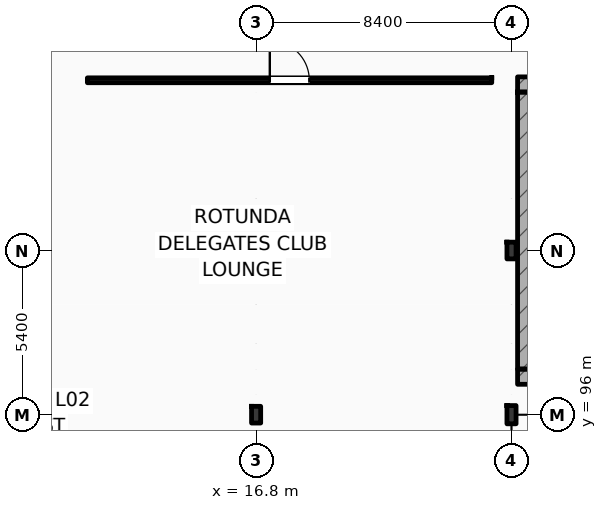
"""IFC4 building model, lengths in metres.
Left out: names, types, materials, properties, quantities, classifications, styles, units other than length and angle.
Written with IfcOpenShell. Run it as: python <this file> out.ifc"""

import sys

from ifc_helpers import new_model, si_unit, direction, frame, frame_2d, origin, origin_2d, place, context, subcontext, project, spatial, rectangle, i_section, extrude, element, fill, save


model = new_model("IFC4")
c1 = context("Model", 3, precision=1e-05, world=origin(), true_north=direction((0.0, 1.0)))
c2 = subcontext(c1, "Body", "Model", "MODEL_VIEW")
j1 = project(units=[si_unit("LENGTHUNIT", "METRE"), si_unit("PLANEANGLEUNIT", "RADIAN")], contexts=[c1])
p1 = place(None, origin())
s1 = spatial("IfcSite", under=j1, at=p1, CompositionType="ELEMENT")
p2 = place(p1, origin())
s2 = spatial("IfcBuilding", under=s1, at=p2, CompositionType="ELEMENT")
p3 = place(p2, frame((0.0, 0.0, 11.4)))
s3 = spatial("IfcBuildingStorey", under=s2, at=p3, CompositionType="ELEMENT", Elevation=11.4)
p4 = place(p3, frame((16.8, 96.0, 0.0), z_axis=(0.0, 0.0, 1.0), x_axis=(1.0, 0.0, 0.0)))
e1 = element("IfcColumn", 1, at=p4, inside=s3, PredefinedType="COLUMN", context=c2, shape_type="SweptSolid", body=[
    extrude(i_section(OverallWidth=0.3, OverallDepth=0.55, WebThickness=0.015, FlangeThickness=0.029, FilletRadius=0.027, at=origin_2d()), origin(), (0.0, 0.0, 1.0), 4.8),
])
p5 = place(p3, frame((25.2, 96.0, 0.0), z_axis=(0.0, 0.0, 1.0), x_axis=(1.0, 0.0, 0.0)))
e2 = element("IfcColumn", 2, at=p5, inside=s3, PredefinedType="COLUMN", context=c2, shape_type="SweptSolid", body=[
    extrude(i_section(OverallWidth=0.3, OverallDepth=0.6, WebThickness=0.015, FlangeThickness=0.03, FilletRadius=0.027, at=origin_2d()), origin(), (0.0, 0.0, 1.0), 4.8),
])
for number, where, z_axis, x_axis in (
    (3, (16.8, 101.4, 0.0), (0.0, 0.0, 1.0), (1.0, 0.0, 0.0)),
    (4, (25.2, 101.4, 0.0), (0.0, 0.0, 1.0), (1.0, 0.0, 0.0)),
):
    element("IfcColumn", number, at=place(p3, frame(where, z_axis=z_axis, x_axis=x_axis)), inside=s3, PredefinedType="COLUMN", context=c2, shape_type="SweptSolid", body=[
        extrude(i_section(OverallWidth=0.3, OverallDepth=0.55, WebThickness=0.015, FlangeThickness=0.029, FilletRadius=0.027, at=origin_2d()), origin(), (0.0, 0.0, 1.0), 4.8),
    ])
for number, where, z_axis, x_axis in (
    (5, (25.4, 106.862, 0.0), (0.0, 0.0, 1.0), (1.0, 0.0, 0.0)),
    (6, (25.4, 97.25, 0.0), (0.0, 0.0, 1.0), (1.0, 0.0, 0.0)),
):
    element("IfcWall", number, at=place(p3, frame(where, z_axis=z_axis, x_axis=x_axis)), inside=s3, PredefinedType="SHEAR", context=c2, shape_type="SweptSolid", body=[
        extrude(rectangle(XDim=5.16, YDim=0.5, at=frame_2d((2.58, 0.0))), origin(), (0.0, 0.0, 1.0), 4.8),
    ])
p6 = place(p3, frame((25.65, 97.5, 0.0), z_axis=(0.0, 0.0, 1.0), x_axis=(0.0, 1.0, 0.0)))
e7 = element("IfcWall", 7, at=p6, inside=s3, PredefinedType="SHEAR", context=c2, shape_type="SweptSolid", body=[
    extrude(rectangle(XDim=9.112, YDim=0.5, at=frame_2d((4.556, 0.0))), origin(), (0.0, 0.0, 1.0), 4.8),
])
p7 = place(p3, frame((11.25, 107.0, 0.0), z_axis=(0.0, 0.0, 1.0), x_axis=(1.0, 0.0, 0.0)))
e8 = element("IfcWall", 8, at=p7, inside=s3, PredefinedType="PARTITIONING", context=c2, shape_type="SweptSolid", body=[
    extrude(rectangle(XDim=13.3, YDim=0.16, at=frame_2d((6.65, 0.0))), origin(), (0.0, 0.0, 1.0), 4.52),
])
p8 = place(p7, frame((6.0, 0.0, 0.0)))
e9 = element("IfcOpeningElement", 9, at=p8, cuts=e8, PredefinedType="OPENING", context=c2, shape_type="SweptSolid", body=[
    extrude(rectangle(XDim=1.3, YDim=2.2, at=frame_2d((0.65, 1.1))), frame((0.0, 0.09, 0.0), z_axis=(0.0, -1.0, 0.0), x_axis=(1.0, 0.0, 0.0)), (0.0, 0.0, 1.0), 0.18),
])
p9 = place(p8, origin())
e10 = element("IfcDoor", 10, at=p9, inside=s3, OperationType="SINGLE_SWING_LEFT", PredefinedType="DOOR", context=c2, shape_type="SweptSolid", body=[
    extrude(rectangle(XDim=1.3, YDim=2.2, at=frame_2d((0.65, 1.1))), frame((0.0, 0.025, 0.0), z_axis=(0.0, -1.0, 0.0), x_axis=(1.0, 0.0, 0.0)), (0.0, 0.0, 1.0), 0.05),
])
fill(e9, e10)
save(model, sys.argv[1])
